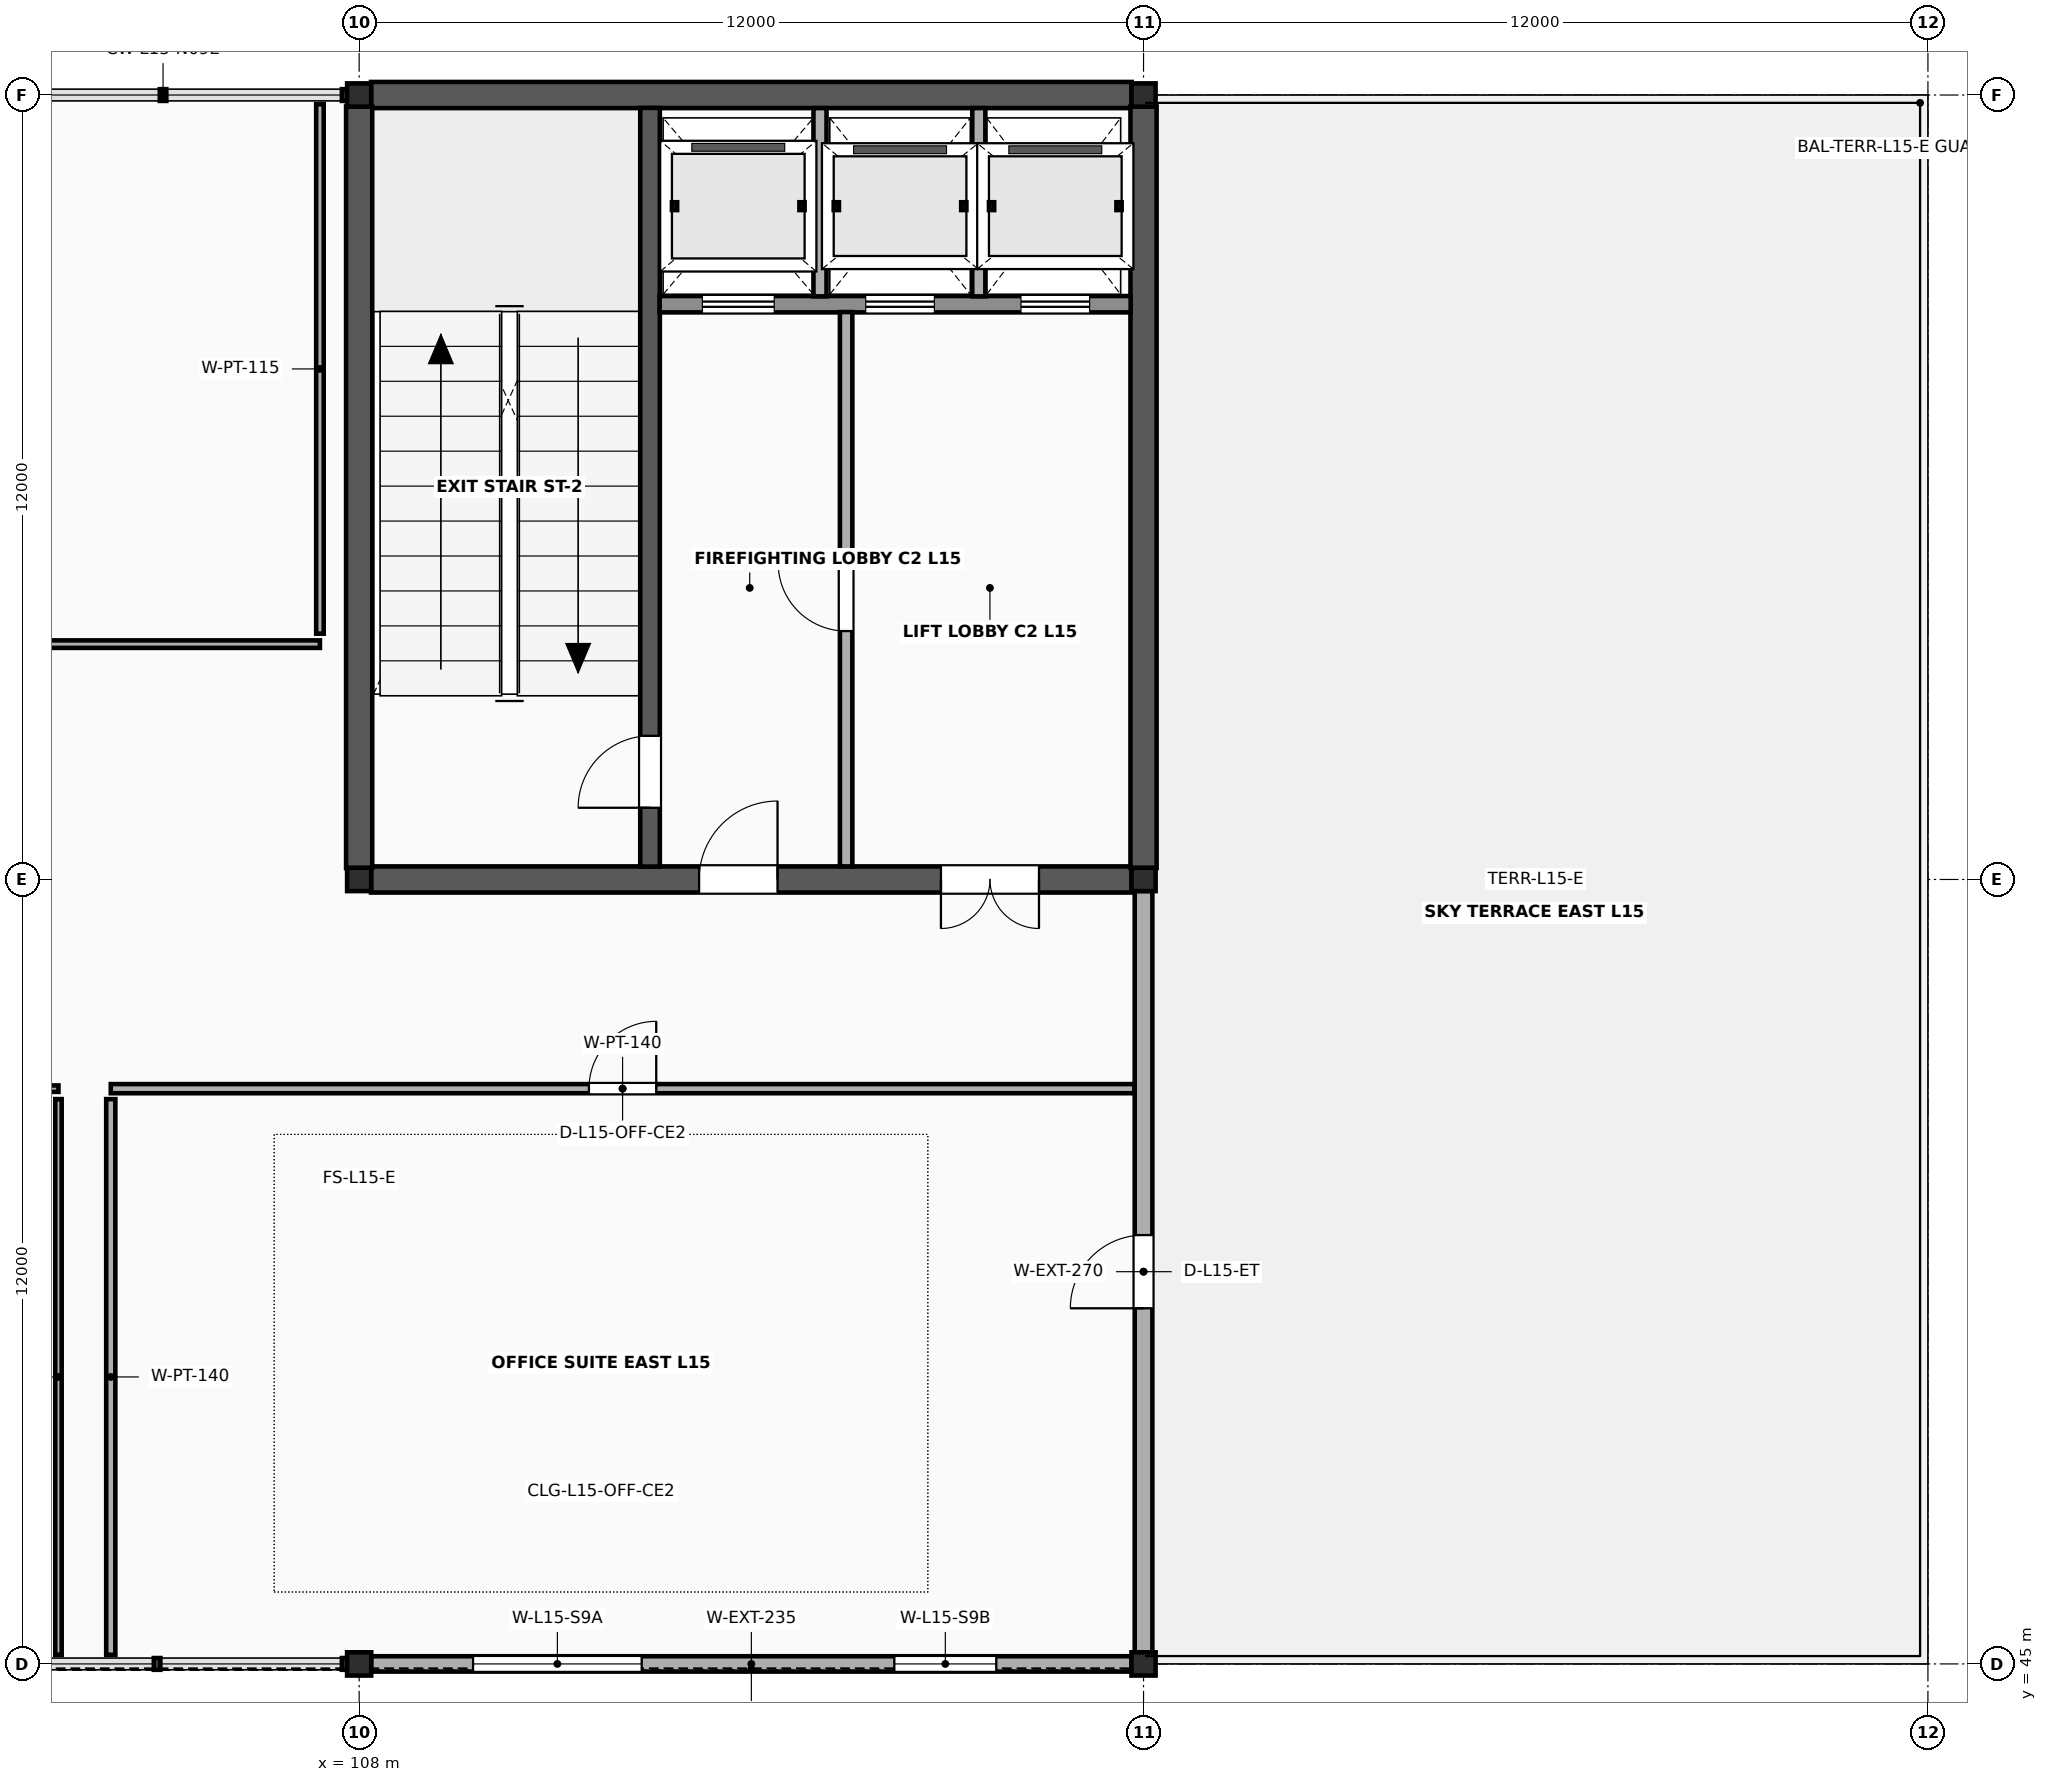
"""IFC4 building model, lengths in metres.
Left out: names, types, materials, properties, quantities, classifications, styles, units other than length and angle.
Written with IfcOpenShell. Run it as: python <this file> out.ifc"""

import sys

from ifc_helpers import new_model, si_unit, direction, frame, frame_2d, origin, origin_2d, place, context, subcontext, project, spatial, rectangle, i_section, extrude, element, fill, save


model = new_model("IFC4")
c1 = context("Model", 3, precision=1e-05, world=origin(), true_north=direction((0.0, 1.0)))
c2 = subcontext(c1, "Body", "Model", "MODEL_VIEW")
j1 = project(units=[si_unit("LENGTHUNIT", "METRE"), si_unit("PLANEANGLEUNIT", "RADIAN")], contexts=[c1])
p1 = place(None, origin())
s1 = spatial("IfcSite", under=j1, at=p1, CompositionType="ELEMENT")
p2 = place(p1, origin())
s2 = spatial("IfcBuilding", under=s1, at=p2, CompositionType="ELEMENT")
p3 = place(p2, frame((0.0, 0.0, 61.6)))
s3 = spatial("IfcBuildingStorey", under=s2, at=p3, CompositionType="ELEMENT", Elevation=61.6)
for number, where, z_axis, x_axis in (
    (1, (108.0, 45.0, 0.0), (0.0, 0.0, 1.0), (1.0, 0.0, 0.0)),
    (2, (108.0, 57.0, 0.0), (0.0, 0.0, 1.0), (1.0, 0.0, 0.0)),
    (3, (108.0, 69.0, 0.0), (0.0, 0.0, 1.0), (1.0, 0.0, 0.0)),
    (4, (120.0, 45.0, 0.0), (0.0, 0.0, 1.0), (1.0, 0.0, 0.0)),
    (5, (120.0, 57.0, 0.0), (0.0, 0.0, 1.0), (1.0, 0.0, 0.0)),
    (6, (120.0, 69.0, 0.0), (0.0, 0.0, 1.0), (1.0, 0.0, 0.0)),
):
    element("IfcColumn", number, at=place(p3, frame(where, z_axis=z_axis, x_axis=x_axis)), inside=s3, PredefinedType="COLUMN", context=c2, shape_type="SweptSolid", body=[
        extrude(i_section(OverallWidth=0.369, OverallDepth=0.356, WebThickness=0.011, FlangeThickness=0.018, FilletRadius=0.018, at=origin_2d()), origin(), (0.0, 0.0, 1.0), 4.0),
    ])
p4 = place(p3, frame((108.181, 57.0, 0.0), z_axis=(0.0, 0.0, 1.0), x_axis=(1.0, 0.0, 0.0)))
e7 = element("IfcWall", 7, at=p4, inside=s3, PredefinedType="SHEAR", context=c2, shape_type="SweptSolid", body=[
    extrude(rectangle(XDim=11.637, YDim=0.4, at=frame_2d((5.819, 0.0))), origin(), (0.0, 0.0, 1.0), 3.843),
])
p5 = place(p4, frame((5.019, 0.0, 0.0)))
e8 = element("IfcOpeningElement", 8, at=p5, cuts=e7, PredefinedType="OPENING", context=c2, shape_type="SweptSolid", body=[
    extrude(rectangle(XDim=1.2, YDim=2.2, at=frame_2d((0.6, 1.1))), frame((0.0, 0.215, 0.0), z_axis=(0.0, -1.0, 0.0), x_axis=(1.0, 0.0, 0.0)), (0.0, 0.0, 1.0), 0.43),
])
p6 = place(p4, frame((8.719, 0.0, 0.0)))
e9 = element("IfcOpeningElement", 9, at=p6, cuts=e7, PredefinedType="OPENING", context=c2, shape_type="SweptSolid", body=[
    extrude(rectangle(XDim=1.5, YDim=2.25, at=frame_2d((0.75, 1.125))), frame((0.0, 0.215, 0.0), z_axis=(0.0, -1.0, 0.0), x_axis=(1.0, 0.0, 0.0)), (0.0, 0.0, 1.0), 0.43),
])
p7 = place(p3, frame((108.181, 69.0, 0.0), z_axis=(0.0, 0.0, 1.0), x_axis=(1.0, 0.0, 0.0)))
e10 = element("IfcWall", 10, at=p7, inside=s3, PredefinedType="SHEAR", context=c2, shape_type="SweptSolid", body=[
    extrude(rectangle(XDim=11.637, YDim=0.4, at=frame_2d((5.819, 0.0))), origin(), (0.0, 0.0, 1.0), 3.843),
])
for number, where, z_axis, x_axis in (
    (11, (108.0, 57.175, 0.0), (0.0, 0.0, 1.0), (0.0, 1.0, 0.0)),
    (12, (120.0, 57.175, 0.0), (0.0, 0.0, 1.0), (0.0, 1.0, 0.0)),
):
    element("IfcWall", number, at=place(p3, frame(where, z_axis=z_axis, x_axis=x_axis)), inside=s3, PredefinedType="SHEAR", context=c2, shape_type="SweptSolid", body=[
        extrude(rectangle(XDim=11.65, YDim=0.4, at=frame_2d((5.825, 0.0))), origin(), (0.0, 0.0, 1.0), 3.843),
    ])
p8 = place(p3, frame((112.45, 57.197, 0.0), z_axis=(0.0, 0.0, 1.0), x_axis=(0.0, 1.0, 0.0)))
e13 = element("IfcWall", 13, at=p8, inside=s3, PredefinedType="SHEAR", context=c2, shape_type="SweptSolid", body=[
    extrude(rectangle(XDim=11.606, YDim=0.3, at=frame_2d((5.803, 0.0))), origin(), (0.0, 0.0, 1.0), 3.843),
])
p9 = place(p8, frame((0.9, 0.0, 0.0)))
e14 = element("IfcOpeningElement", 14, at=p9, cuts=e13, PredefinedType="OPENING", context=c2, shape_type="SweptSolid", body=[
    extrude(rectangle(XDim=1.1, YDim=2.2, at=frame_2d((0.55, 1.1))), frame((0.0, 0.165, 0.0), z_axis=(0.0, -1.0, 0.0), x_axis=(1.0, 0.0, 0.0)), (0.0, 0.0, 1.0), 0.33),
])
p10 = place(p3, frame((112.597, 65.8, 0.0), z_axis=(0.0, 0.0, 1.0), x_axis=(1.0, 0.0, 0.0)))
e15 = element("IfcWall", 15, at=p10, inside=s3, PredefinedType="SOLIDWALL", context=c2, shape_type="SweptSolid", body=[
    extrude(rectangle(XDim=7.206, YDim=0.25, at=frame_2d((3.603, 0.0))), origin(), (0.0, 0.0, 1.0), 3.843),
])
p11 = place(p10, frame((0.653, 0.0, 0.0)))
e16 = element("IfcOpeningElement", 16, at=p11, cuts=e15, PredefinedType="OPENING", context=c2, shape_type="SweptSolid", body=[
    extrude(rectangle(XDim=1.1, YDim=2.24, at=frame_2d((0.55, 1.12))), frame((0.0, 0.14, 0.0), z_axis=(0.0, -1.0, 0.0), x_axis=(1.0, 0.0, 0.0)), (0.0, 0.0, 1.0), 0.28),
])
p12 = place(p10, frame((3.153, 0.0, 0.0)))
e17 = element("IfcOpeningElement", 17, at=p12, cuts=e15, PredefinedType="OPENING", context=c2, shape_type="SweptSolid", body=[
    extrude(rectangle(XDim=1.05, YDim=2.2, at=frame_2d((0.525, 1.1))), frame((0.0, 0.14, 0.0), z_axis=(0.0, -1.0, 0.0), x_axis=(1.0, 0.0, 0.0)), (0.0, 0.0, 1.0), 0.28),
])
p13 = place(p10, frame((5.528, 0.0, 0.0)))
e18 = element("IfcOpeningElement", 18, at=p13, cuts=e15, PredefinedType="OPENING", context=c2, shape_type="SweptSolid", body=[
    extrude(rectangle(XDim=1.05, YDim=2.2, at=frame_2d((0.525, 1.1))), frame((0.0, 0.14, 0.0), z_axis=(0.0, -1.0, 0.0), x_axis=(1.0, 0.0, 0.0)), (0.0, 0.0, 1.0), 0.28),
])
for number, where, z_axis, x_axis in (
    (19, (115.05, 65.92, 0.0), (0.0, 0.0, 1.0), (0.0, 1.0, 0.0)),
    (20, (117.48, 65.92, 0.0), (0.0, 0.0, 1.0), (0.0, 1.0, 0.0)),
):
    element("IfcWall", number, at=place(p3, frame(where, z_axis=z_axis, x_axis=x_axis)), inside=s3, PredefinedType="SOLIDWALL", context=c2, shape_type="SweptSolid", body=[
        extrude(rectangle(XDim=2.88, YDim=0.2, at=frame_2d((1.44, 0.0))), origin(), (0.0, 0.0, 1.0), 3.833),
    ])
p14 = place(p3, frame((115.45, 57.2, 0.0), z_axis=(0.0, 0.0, 1.0), x_axis=(0.0, 1.0, 0.0)))
e21 = element("IfcWall", 21, at=p14, inside=s3, PredefinedType="SOLIDWALL", context=c2, shape_type="SweptSolid", body=[
    extrude(rectangle(XDim=8.48, YDim=0.19, at=frame_2d((4.24, 0.0))), origin(), (0.0, 0.0, 1.0), 3.833),
])
p15 = place(p14, frame((3.6, 0.0, 0.0)))
e22 = element("IfcOpeningElement", 22, at=p15, cuts=e21, PredefinedType="OPENING", context=c2, shape_type="SweptSolid", body=[
    extrude(rectangle(XDim=1.04, YDim=2.18, at=frame_2d((0.52, 1.09))), frame((0.0, 0.11, 0.0), z_axis=(0.0, -1.0, 0.0), x_axis=(1.0, 0.0, 0.0)), (0.0, 0.0, 1.0), 0.22),
])
p16 = place(p3, frame((108.183, 45.0, 0.0), z_axis=(0.0, 0.0, 1.0), x_axis=(1.0, 0.0, 0.0)))
e23 = element("IfcWall", 23, at=p16, inside=s3, PredefinedType="SOLIDWALL", context=c2, shape_type="SweptSolid", body=[
    extrude(rectangle(XDim=11.635, YDim=0.235, at=frame_2d((5.817, 0.0))), origin(), (0.0, 0.0, 1.0), 3.296),
])
p17 = place(p16, frame((1.56, 0.0, 0.78)))
e24 = element("IfcOpeningElement", 24, at=p17, cuts=e23, PredefinedType="OPENING", context=c2, shape_type="SweptSolid", body=[
    extrude(rectangle(XDim=2.58, YDim=1.74, at=frame_2d((1.29, 0.87))), frame((0.0, 0.133, 0.0), z_axis=(0.0, -1.0, 0.0), x_axis=(1.0, 0.0, 0.0)), (0.0, 0.0, 1.0), 0.265),
])
p18 = place(p16, frame((8.005, 0.0, 0.78)))
e25 = element("IfcOpeningElement", 25, at=p18, cuts=e23, PredefinedType="OPENING", context=c2, shape_type="SweptSolid", body=[
    extrude(rectangle(XDim=1.56, YDim=1.9, at=frame_2d((0.78, 0.95))), frame((0.0, 0.133, 0.0), z_axis=(0.0, -1.0, 0.0), x_axis=(1.0, 0.0, 0.0)), (0.0, 0.0, 1.0), 0.265),
])
p19 = place(p3, frame((120.0, 45.176, 0.0), z_axis=(0.0, 0.0, 1.0), x_axis=(0.0, 1.0, 0.0)))
e26 = element("IfcWall", 26, at=p19, inside=s3, PredefinedType="SOLIDWALL", context=c2, shape_type="SweptSolid", body=[
    extrude(rectangle(XDim=11.648, YDim=0.27, at=frame_2d((5.824, 0.0))), origin(), (0.0, 0.0, 1.0), 3.296),
])
p20 = place(p19, frame((5.264, 0.0, 0.0)))
e27 = element("IfcOpeningElement", 27, at=p20, cuts=e26, PredefinedType="OPENING", context=c2, shape_type="SweptSolid", body=[
    extrude(rectangle(XDim=1.12, YDim=2.18, at=frame_2d((0.56, 1.09))), frame((0.0, 0.15, 0.0), z_axis=(0.0, -1.0, 0.0), x_axis=(1.0, 0.0, 0.0)), (0.0, 0.0, 1.0), 0.3),
])
p21 = place(p3, frame((84.6, 53.8, 0.0), z_axis=(0.0, 0.0, 1.0), x_axis=(1.0, 0.0, 0.0)))
e28 = element("IfcWall", 28, at=p21, inside=s3, PredefinedType="PARTITIONING", context=c2, shape_type="SweptSolid", body=[
    extrude(rectangle(XDim=18.8, YDim=0.098, at=frame_2d((9.4, 0.0))), origin(), (0.0, 0.0, 1.0), 2.88),
])
p22 = place(p21, frame((8.905, 0.0, 0.0)))
e29 = element("IfcOpeningElement", 29, at=p22, cuts=e28, PredefinedType="OPENING", context=c2, shape_type="SweptSolid", body=[
    extrude(rectangle(XDim=0.99, YDim=2.15, at=frame_2d((0.495, 1.075))), frame((0.0, 0.064, 0.0), z_axis=(0.0, -1.0, 0.0), x_axis=(1.0, 0.0, 0.0)), (0.0, 0.0, 1.0), 0.128),
])
p23 = place(p3, frame((103.4, 45.14, 0.0), z_axis=(0.0, 0.0, 1.0), x_axis=(0.0, 1.0, 0.0)))
e30 = element("IfcWall", 30, at=p23, inside=s3, PredefinedType="PARTITIONING", context=c2, shape_type="SweptSolid", body=[
    extrude(rectangle(XDim=8.5, YDim=0.098, at=frame_2d((4.25, 0.0))), origin(), (0.0, 0.0, 1.0), 2.88),
])
p24 = place(p3, frame((104.2, 53.8, 0.0), z_axis=(0.0, 0.0, 1.0), x_axis=(1.0, 0.0, 0.0)))
e31 = element("IfcWall", 31, at=p24, inside=s3, PredefinedType="PARTITIONING", context=c2, shape_type="SweptSolid", body=[
    extrude(rectangle(XDim=15.66, YDim=0.14, at=frame_2d((7.83, 0.0))), origin(), (0.0, 0.0, 1.0), 2.88),
])
p25 = place(p24, frame((7.315, 0.0, 0.0)))
e32 = element("IfcOpeningElement", 32, at=p25, cuts=e31, PredefinedType="OPENING", context=c2, shape_type="SweptSolid", body=[
    extrude(rectangle(XDim=1.03, YDim=2.17, at=frame_2d((0.515, 1.085))), frame((0.0, 0.085, 0.0), z_axis=(0.0, -1.0, 0.0), x_axis=(1.0, 0.0, 0.0)), (0.0, 0.0, 1.0), 0.17),
])
p26 = place(p3, frame((104.2, 45.14, 0.0), z_axis=(0.0, 0.0, 1.0), x_axis=(0.0, 1.0, 0.0)))
e33 = element("IfcWall", 33, at=p26, inside=s3, PredefinedType="PARTITIONING", context=c2, shape_type="SweptSolid", body=[
    extrude(rectangle(XDim=8.5, YDim=0.14, at=frame_2d((4.25, 0.0))), origin(), (0.0, 0.0, 1.0), 2.88),
])
p27 = place(p3, frame((72.6, 60.6, 0.0), z_axis=(0.0, 0.0, 1.0), x_axis=(1.0, 0.0, 0.0)))
e34 = element("IfcWall", 34, at=p27, inside=s3, PredefinedType="PARTITIONING", context=c2, shape_type="SweptSolid", body=[
    extrude(rectangle(XDim=34.8, YDim=0.115, at=frame_2d((17.4, 0.0))), origin(), (0.0, 0.0, 1.0), 2.88),
])
p28 = place(p27, frame((16.565, 0.0, 0.0)))
e35 = element("IfcOpeningElement", 35, at=p28, cuts=e34, PredefinedType="OPENING", context=c2, shape_type="SweptSolid", body=[
    extrude(rectangle(XDim=1.67, YDim=2.35, at=frame_2d((0.835, 1.175))), frame((0.0, 0.073, 0.0), z_axis=(0.0, -1.0, 0.0), x_axis=(1.0, 0.0, 0.0)), (0.0, 0.0, 1.0), 0.145),
])
p29 = place(p3, frame((107.4, 60.76, 0.0), z_axis=(0.0, 0.0, 1.0), x_axis=(0.0, 1.0, 0.0)))
e36 = element("IfcWall", 36, at=p29, inside=s3, PredefinedType="PARTITIONING", context=c2, shape_type="SweptSolid", body=[
    extrude(rectangle(XDim=8.1, YDim=0.115, at=frame_2d((4.05, 0.0))), origin(), (0.0, 0.0, 1.0), 2.88),
])
p30 = place(p17, origin())
e37 = element("IfcWindow", 37, at=p30, inside=s3, PartitioningType="DOUBLE_PANEL_VERTICAL", PredefinedType="WINDOW", context=c2, shape_type="SweptSolid", body=[
    extrude(rectangle(XDim=2.58, YDim=1.74, at=frame_2d((1.29, 0.87))), frame((0.0, 0.03, 0.0), z_axis=(0.0, -1.0, 0.0), x_axis=(1.0, 0.0, 0.0)), (0.0, 0.0, 1.0), 0.06),
])
fill(e24, e37)
p31 = place(p18, origin())
e38 = element("IfcWindow", 38, at=p31, inside=s3, PartitioningType="SINGLE_PANEL", PredefinedType="WINDOW", context=c2, shape_type="SweptSolid", body=[
    extrude(rectangle(XDim=1.56, YDim=1.9, at=frame_2d((0.78, 0.95))), frame((0.0, 0.03, 0.0), z_axis=(0.0, -1.0, 0.0), x_axis=(1.0, 0.0, 0.0)), (0.0, 0.0, 1.0), 0.06),
])
fill(e25, e38)
p32 = place(p20, origin())
e39 = element("IfcDoor", 39, at=p32, inside=s3, OperationType="SINGLE_SWING_LEFT", PredefinedType="DOOR", context=c2, shape_type="SweptSolid", body=[
    extrude(rectangle(XDim=1.12, YDim=2.18, at=frame_2d((0.56, 1.09))), frame((0.0, 0.025, 0.0), z_axis=(0.0, -1.0, 0.0), x_axis=(1.0, 0.0, 0.0)), (0.0, 0.0, 1.0), 0.05),
])
fill(e27, e39)
p33 = place(p9, origin())
e40 = element("IfcDoor", 40, at=p33, inside=s3, OperationType="SINGLE_SWING_LEFT", PredefinedType="DOOR", context=c2, shape_type="SweptSolid", body=[
    extrude(rectangle(XDim=1.1, YDim=2.2, at=frame_2d((0.55, 1.1))), frame((0.0, 0.025, 0.0), z_axis=(0.0, -1.0, 0.0), x_axis=(1.0, 0.0, 0.0)), (0.0, 0.0, 1.0), 0.05),
])
fill(e14, e40)
p34 = place(p15, origin())
e41 = element("IfcDoor", 41, at=p34, inside=s3, OperationType="SINGLE_SWING_RIGHT", PredefinedType="DOOR", context=c2, shape_type="SweptSolid", body=[
    extrude(rectangle(XDim=1.04, YDim=2.18, at=frame_2d((0.52, 1.09))), frame((0.0, 0.025, 0.0), z_axis=(0.0, -1.0, 0.0), x_axis=(1.0, 0.0, 0.0)), (0.0, 0.0, 1.0), 0.05),
])
fill(e22, e41)
p35 = place(p5, origin())
e42 = element("IfcDoor", 42, at=p35, inside=s3, OperationType="SINGLE_SWING_RIGHT", PredefinedType="DOOR", context=c2, shape_type="SweptSolid", body=[
    extrude(rectangle(XDim=1.2, YDim=2.2, at=frame_2d((0.6, 1.1))), frame((0.0, 0.025, 0.0), z_axis=(0.0, -1.0, 0.0), x_axis=(1.0, 0.0, 0.0)), (0.0, 0.0, 1.0), 0.05),
])
fill(e8, e42)
p36 = place(p6, origin())
e43 = element("IfcDoor", 43, at=p36, inside=s3, OperationType="DOUBLE_DOOR_SINGLE_SWING", PredefinedType="DOOR", context=c2, shape_type="SweptSolid", body=[
    extrude(rectangle(XDim=1.5, YDim=2.25, at=frame_2d((0.75, 1.125))), frame((0.0, 0.025, 0.0), z_axis=(0.0, -1.0, 0.0), x_axis=(1.0, 0.0, 0.0)), (0.0, 0.0, 1.0), 0.05),
])
fill(e9, e43)
p37 = place(p11, origin())
e44 = element("IfcDoor", 44, at=p37, inside=s3, OperationType="SLIDING_TO_LEFT", PredefinedType="USERDEFINED", context=c2, shape_type="SweptSolid", body=[
    extrude(rectangle(XDim=1.1, YDim=2.24, at=frame_2d((0.55, 1.12))), frame((0.0, 0.025, 0.0), z_axis=(0.0, -1.0, 0.0), x_axis=(1.0, 0.0, 0.0)), (0.0, 0.0, 1.0), 0.05),
])
fill(e16, e44)
p38 = place(p12, origin())
e45 = element("IfcDoor", 45, at=p38, inside=s3, OperationType="SLIDING_TO_LEFT", PredefinedType="USERDEFINED", context=c2, shape_type="SweptSolid", body=[
    extrude(rectangle(XDim=1.05, YDim=2.2, at=frame_2d((0.525, 1.1))), frame((0.0, 0.025, 0.0), z_axis=(0.0, -1.0, 0.0), x_axis=(1.0, 0.0, 0.0)), (0.0, 0.0, 1.0), 0.05),
])
fill(e17, e45)
p39 = place(p13, origin())
e46 = element("IfcDoor", 46, at=p39, inside=s3, OperationType="SLIDING_TO_LEFT", PredefinedType="USERDEFINED", context=c2, shape_type="SweptSolid", body=[
    extrude(rectangle(XDim=1.05, YDim=2.2, at=frame_2d((0.525, 1.1))), frame((0.0, 0.025, 0.0), z_axis=(0.0, -1.0, 0.0), x_axis=(1.0, 0.0, 0.0)), (0.0, 0.0, 1.0), 0.05),
])
fill(e18, e46)
p40 = place(p25, origin())
e47 = element("IfcDoor", 47, at=p40, inside=s3, OperationType="SINGLE_SWING_RIGHT", PredefinedType="DOOR", context=c2, shape_type="SweptSolid", body=[
    extrude(rectangle(XDim=1.03, YDim=2.17, at=frame_2d((0.515, 1.085))), frame((0.0, 0.025, 0.0), z_axis=(0.0, -1.0, 0.0), x_axis=(1.0, 0.0, 0.0)), (0.0, 0.0, 1.0), 0.05),
])
fill(e32, e47)
save(model, sys.argv[1])
